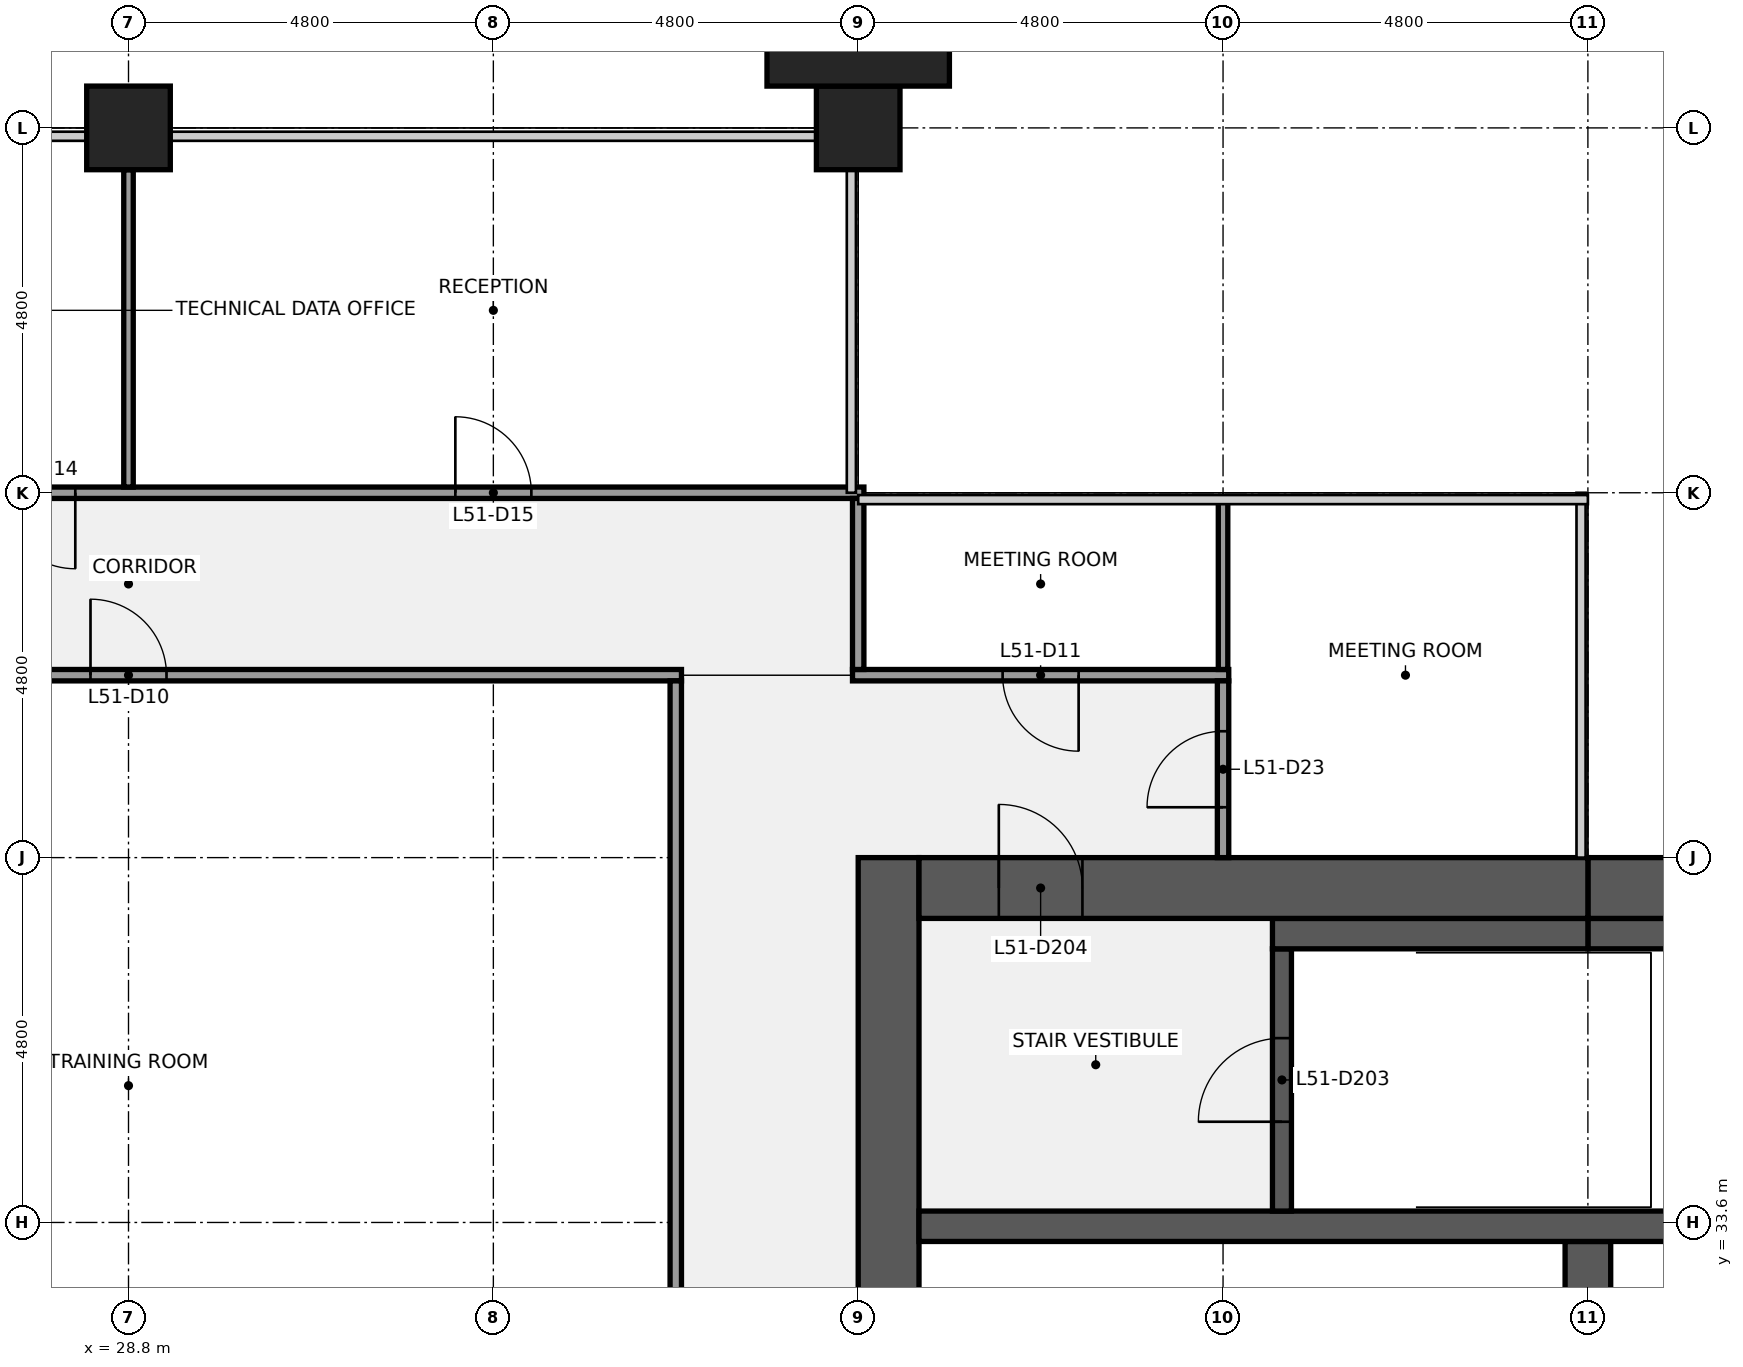
"""IFC4 building model, lengths in metres.
Left out: names, types, materials, properties, quantities, classifications, styles, units other than length and angle.
Written with IfcOpenShell. Run it as: python <this file> out.ifc"""

import sys

from ifc_helpers import new_model, si_unit, direction, frame, frame_2d, origin, origin_2d, place, context, subcontext, project, spatial, rectangle, extrude, element, fill, save


model = new_model("IFC4")
c1 = context("Model", 3, precision=1e-05, world=origin(), true_north=direction((0.0, 1.0)))
c2 = subcontext(c1, "Body", "Model", "MODEL_VIEW")
j1 = project(units=[si_unit("LENGTHUNIT", "METRE"), si_unit("PLANEANGLEUNIT", "RADIAN")], contexts=[c1])
p1 = place(None, origin())
s1 = spatial("IfcSite", under=j1, at=p1, CompositionType="ELEMENT")
p2 = place(p1, origin())
s2 = spatial("IfcBuilding", under=s1, at=p2, CompositionType="ELEMENT")
p3 = place(p2, frame((0.0, 0.0, 233.2)))
s3 = spatial("IfcBuildingStorey", under=s2, at=p3, CompositionType="ELEMENT", Elevation=233.2)
for number, where, z_axis, x_axis in (
    (1, (28.8, 48.0, 0.0), (0.0, 0.0, 1.0), (1.0, 0.0, 0.0)),
    (2, (38.4, 48.0, 0.0), (0.0, 0.0, 1.0), (1.0, 0.0, 0.0)),
):
    element("IfcColumn", number, at=place(p3, frame(where, z_axis=z_axis, x_axis=x_axis)), inside=s3, PredefinedType="COLUMN", context=c2, shape_type="SweptSolid", body=[
        extrude(rectangle(XDim=1.1, YDim=1.1, at=origin_2d()), origin(), (0.0, 0.0, 1.0), 4.0),
    ])
p4 = place(p3, frame((38.8, 9.6, 0.0), z_axis=(0.0, 0.0, 1.0), x_axis=(0.0, 1.0, 0.0)))
e3 = element("IfcWall", 3, at=p4, inside=s3, PredefinedType="SHEAR", context=c2, shape_type="SweptSolid", body=[
    extrude(rectangle(XDim=28.8, YDim=0.8, at=frame_2d((14.4, 0.0))), origin(), (0.0, 0.0, 1.0), 3.84),
])
p5 = place(p4, frame((8.7, 0.0, 0.0)))
e4 = element("IfcOpeningElement", 4, at=p5, cuts=e3, PredefinedType="OPENING", context=c2, shape_type="SweptSolid", body=[
    extrude(rectangle(XDim=1.8, YDim=2.1, at=frame_2d((0.9, 1.05))), frame((0.0, 0.41, 0.0), z_axis=(0.0, -1.0, 0.0), x_axis=(1.0, 0.0, 0.0)), (0.0, 0.0, 1.0), 0.82),
])
p6 = place(p4, frame((18.3, 0.0, 0.0)))
e5 = element("IfcOpeningElement", 5, at=p6, cuts=e3, PredefinedType="OPENING", context=c2, shape_type="SweptSolid", body=[
    extrude(rectangle(XDim=1.8, YDim=2.1, at=frame_2d((0.9, 1.05))), frame((0.0, 0.41, 0.0), z_axis=(0.0, -1.0, 0.0), x_axis=(1.0, 0.0, 0.0)), (0.0, 0.0, 1.0), 0.82),
])
p7 = place(p3, frame((48.0, 30.75, 0.0), z_axis=(0.0, 0.0, 1.0), x_axis=(0.0, 1.0, 0.0)))
e6 = element("IfcWall", 6, at=p7, inside=s3, PredefinedType="SHEAR", context=c2, shape_type="SweptSolid", body=[
    extrude(rectangle(XDim=2.6, YDim=0.6, at=frame_2d((1.3, 0.0))), origin(), (0.0, 0.0, 1.0), 3.84),
])
p8 = place(p3, frame((39.2, 33.55, 0.0), z_axis=(0.0, 0.0, 1.0), x_axis=(1.0, 0.0, 0.0)))
e7 = element("IfcWall", 7, at=p8, inside=s3, PredefinedType="SHEAR", context=c2, shape_type="SweptSolid", body=[
    extrude(rectangle(XDim=17.6, YDim=0.4, at=frame_2d((8.8, 0.0))), origin(), (0.0, 0.0, 1.0), 3.84),
])
p9 = place(p3, frame((43.975, 33.75, 0.0), z_axis=(0.0, 0.0, 1.0), x_axis=(0.0, 1.0, 0.0)))
e8 = element("IfcWall", 8, at=p9, inside=s3, PredefinedType="SHEAR", context=c2, shape_type="SweptSolid", body=[
    extrude(rectangle(XDim=3.45, YDim=0.25, at=frame_2d((1.725, 0.0))), origin(), (0.0, 0.0, 1.0), 3.84),
])
p10 = place(p9, frame((1.175, 0.0, 0.0)))
e9 = element("IfcOpeningElement", 9, at=p10, cuts=e8, PredefinedType="OPENING", context=c2, shape_type="SweptSolid", body=[
    extrude(rectangle(XDim=1.1, YDim=2.1, at=frame_2d((0.55, 1.05))), frame((0.0, 0.135, 0.0), z_axis=(0.0, -1.0, 0.0), x_axis=(1.0, 0.0, 0.0)), (0.0, 0.0, 1.0), 0.27),
])
p11 = place(p3, frame((48.0, 37.4, 0.0), z_axis=(0.0, 0.0, 1.0), x_axis=(1.0, 0.0, 0.0)))
e10 = element("IfcWall", 10, at=p11, inside=s3, PredefinedType="SHEAR", context=c2, shape_type="SweptSolid", body=[
    extrude(rectangle(XDim=3.35, YDim=0.4, at=frame_2d((1.675, 0.0))), origin(), (0.0, 0.0, 1.0), 3.84),
])
p12 = place(p3, frame((43.85, 37.4, 0.0), z_axis=(0.0, 0.0, 1.0), x_axis=(1.0, 0.0, 0.0)))
e11 = element("IfcWall", 11, at=p12, inside=s3, PredefinedType="SHEAR", context=c2, shape_type="SweptSolid", body=[
    extrude(rectangle(XDim=4.15, YDim=0.4, at=frame_2d((2.075, 0.0))), origin(), (0.0, 0.0, 1.0), 3.84),
])
p13 = place(p3, frame((48.0, 38.0, 0.0), z_axis=(0.0, 0.0, 1.0), x_axis=(1.0, 0.0, 0.0)))
e12 = element("IfcWall", 12, at=p13, inside=s3, PredefinedType="SHEAR", context=c2, shape_type="SweptSolid", body=[
    extrude(rectangle(XDim=8.8, YDim=0.8, at=frame_2d((4.4, 0.0))), origin(), (0.0, 0.0, 1.0), 3.84),
])
p14 = place(p13, frame((1.5, 0.0, 0.9)))
e13 = element("IfcOpeningElement", 13, at=p14, cuts=e12, PredefinedType="OPENING", context=c2, shape_type="SweptSolid", body=[
    extrude(rectangle(XDim=1.8, YDim=1.5, at=frame_2d((0.9, 0.75))), frame((0.0, 0.41, 0.0), z_axis=(0.0, -1.0, 0.0), x_axis=(1.0, 0.0, 0.0)), (0.0, 0.0, 1.0), 0.82),
])
p15 = place(p3, frame((39.2, 38.0, 0.0), z_axis=(0.0, 0.0, 1.0), x_axis=(1.0, 0.0, 0.0)))
e14 = element("IfcWall", 14, at=p15, inside=s3, PredefinedType="SHEAR", context=c2, shape_type="SweptSolid", body=[
    extrude(rectangle(XDim=8.8, YDim=0.8, at=frame_2d((4.4, 0.0))), origin(), (0.0, 0.0, 1.0), 3.84),
])
p16 = place(p15, frame((1.05, 0.0, 0.0)))
e15 = element("IfcOpeningElement", 15, at=p16, cuts=e14, PredefinedType="OPENING", context=c2, shape_type="SweptSolid", body=[
    extrude(rectangle(XDim=1.1, YDim=2.1, at=frame_2d((0.55, 1.05))), frame((0.0, 0.41, 0.0), z_axis=(0.0, -1.0, 0.0), x_axis=(1.0, 0.0, 0.0)), (0.0, 0.0, 1.0), 0.82),
])
p17 = place(p3, frame((21.525, 40.8, 0.0), z_axis=(0.0, 0.0, 1.0), x_axis=(1.0, 0.0, 0.0)))
e16 = element("IfcWall", 16, at=p17, inside=s3, PredefinedType="PARTITIONING", context=c2, shape_type="SweptSolid", body=[
    extrude(rectangle(XDim=14.55, YDim=0.15, at=frame_2d((7.275, 0.0))), origin(), (0.0, 0.0, 1.0), 2.87),
])
p18 = place(p17, frame((6.775, 0.0, 0.0)))
e17 = element("IfcOpeningElement", 17, at=p18, cuts=e16, PredefinedType="OPENING", context=c2, shape_type="SweptSolid", body=[
    extrude(rectangle(XDim=1.0, YDim=2.1, at=frame_2d((0.5, 1.05))), frame((0.0, 0.085, 0.0), z_axis=(0.0, -1.0, 0.0), x_axis=(1.0, 0.0, 0.0)), (0.0, 0.0, 1.0), 0.17),
])
p19 = place(p3, frame((38.325, 40.8, 0.0), z_axis=(0.0, 0.0, 1.0), x_axis=(1.0, 0.0, 0.0)))
e18 = element("IfcWall", 18, at=p19, inside=s3, PredefinedType="PARTITIONING", context=c2, shape_type="SweptSolid", body=[
    extrude(rectangle(XDim=4.95, YDim=0.15, at=frame_2d((2.475, 0.0))), origin(), (0.0, 0.0, 1.0), 2.87),
])
p20 = place(p19, frame((1.975, 0.0, 0.0)))
e19 = element("IfcOpeningElement", 19, at=p20, cuts=e18, PredefinedType="OPENING", context=c2, shape_type="SweptSolid", body=[
    extrude(rectangle(XDim=1.0, YDim=2.1, at=frame_2d((0.5, 1.05))), frame((0.0, 0.085, 0.0), z_axis=(0.0, -1.0, 0.0), x_axis=(1.0, 0.0, 0.0)), (0.0, 0.0, 1.0), 0.17),
])
p21 = place(p3, frame((19.125, 43.2, 0.0), z_axis=(0.0, 0.0, 1.0), x_axis=(1.0, 0.0, 0.0)))
e20 = element("IfcWall", 20, at=p21, inside=s3, PredefinedType="PARTITIONING", context=c2, shape_type="SweptSolid", body=[
    extrude(rectangle(XDim=19.35, YDim=0.15, at=frame_2d((9.675, 0.0))), origin(), (0.0, 0.0, 1.0), 2.87),
])
p22 = place(p21, frame((0.775, 0.0, 0.0)))
e21 = element("IfcOpeningElement", 21, at=p22, cuts=e20, PredefinedType="OPENING", context=c2, shape_type="SweptSolid", body=[
    extrude(rectangle(XDim=1.0, YDim=2.1, at=frame_2d((0.5, 1.05))), frame((0.0, 0.085, 0.0), z_axis=(0.0, -1.0, 0.0), x_axis=(1.0, 0.0, 0.0)), (0.0, 0.0, 1.0), 0.17),
])
p23 = place(p21, frame((4.375, 0.0, 0.0)))
e22 = element("IfcOpeningElement", 22, at=p23, cuts=e20, PredefinedType="OPENING", context=c2, shape_type="SweptSolid", body=[
    extrude(rectangle(XDim=1.0, YDim=2.1, at=frame_2d((0.5, 1.05))), frame((0.0, 0.085, 0.0), z_axis=(0.0, -1.0, 0.0), x_axis=(1.0, 0.0, 0.0)), (0.0, 0.0, 1.0), 0.17),
])
p24 = place(p21, frame((7.975, 0.0, 0.0)))
e23 = element("IfcOpeningElement", 23, at=p24, cuts=e20, PredefinedType="OPENING", context=c2, shape_type="SweptSolid", body=[
    extrude(rectangle(XDim=1.0, YDim=2.1, at=frame_2d((0.5, 1.05))), frame((0.0, 0.085, 0.0), z_axis=(0.0, -1.0, 0.0), x_axis=(1.0, 0.0, 0.0)), (0.0, 0.0, 1.0), 0.17),
])
p25 = place(p21, frame((13.975, 0.0, 0.0)))
e24 = element("IfcOpeningElement", 24, at=p25, cuts=e20, PredefinedType="OPENING", context=c2, shape_type="SweptSolid", body=[
    extrude(rectangle(XDim=1.0, YDim=2.1, at=frame_2d((0.5, 1.05))), frame((0.0, 0.085, 0.0), z_axis=(0.0, -1.0, 0.0), x_axis=(1.0, 0.0, 0.0)), (0.0, 0.0, 1.0), 0.17),
])
p26 = place(p3, frame((28.8, 43.275, 0.0), z_axis=(0.0, 0.0, 1.0), x_axis=(0.0, 1.0, 0.0)))
e25 = element("IfcWall", 25, at=p26, inside=s3, PredefinedType="PARTITIONING", context=c2, shape_type="SweptSolid", body=[
    extrude(rectangle(XDim=4.175, YDim=0.125, at=frame_2d((2.087, 0.0))), origin(), (0.0, 0.0, 1.0), 2.87),
])
p27 = place(p3, frame((36.0, 30.062, 0.0), z_axis=(0.0, 0.0, 1.0), x_axis=(0.0, 1.0, 0.0)))
e26 = element("IfcWall", 26, at=p27, inside=s3, PredefinedType="PARTITIONING", context=c2, shape_type="SweptSolid", body=[
    extrude(rectangle(XDim=10.663, YDim=0.15, at=frame_2d((5.331, 0.0))), origin(), (0.0, 0.0, 1.0), 2.87),
])
p28 = place(p3, frame((38.4, 40.875, 0.0), z_axis=(0.0, 0.0, 1.0), x_axis=(0.0, 1.0, 0.0)))
e27 = element("IfcWall", 27, at=p28, inside=s3, PredefinedType="PARTITIONING", context=c2, shape_type="SweptSolid", body=[
    extrude(rectangle(XDim=2.25, YDim=0.15, at=frame_2d((1.125, 0.0))), origin(), (0.0, 0.0, 1.0), 2.87),
])
p29 = place(p3, frame((43.2, 40.875, 0.0), z_axis=(0.0, 0.0, 1.0), x_axis=(0.0, 1.0, 0.0)))
e28 = element("IfcWall", 28, at=p29, inside=s3, PredefinedType="PARTITIONING", context=c2, shape_type="SweptSolid", body=[
    extrude(rectangle(XDim=2.225, YDim=0.125, at=frame_2d((1.113, 0.0))), origin(), (0.0, 0.0, 1.0), 2.87),
])
p30 = place(p3, frame((43.2, 38.4, 0.0), z_axis=(0.0, 0.0, 1.0), x_axis=(0.0, 1.0, 0.0)))
e29 = element("IfcWall", 29, at=p30, inside=s3, PredefinedType="PARTITIONING", context=c2, shape_type="SweptSolid", body=[
    extrude(rectangle(XDim=2.325, YDim=0.15, at=frame_2d((1.163, 0.0))), origin(), (0.0, 0.0, 1.0), 2.87),
])
p31 = place(p30, frame((0.663, 0.0, 0.0)))
e30 = element("IfcOpeningElement", 30, at=p31, cuts=e29, PredefinedType="OPENING", context=c2, shape_type="SweptSolid", body=[
    extrude(rectangle(XDim=1.0, YDim=2.1, at=frame_2d((0.5, 1.05))), frame((0.0, 0.085, 0.0), z_axis=(0.0, -1.0, 0.0), x_axis=(1.0, 0.0, 0.0)), (0.0, 0.0, 1.0), 0.17),
])
p32 = place(p3, frame((38.4, 49.025, 0.0), z_axis=(0.0, 0.0, 1.0), x_axis=(1.0, 0.0, 0.0)))
e31 = element("IfcColumn", 31, at=p32, inside=s3, PredefinedType="PILASTER", context=c2, shape_type="SweptSolid", body=[
    extrude(rectangle(XDim=2.4, YDim=0.95, at=origin_2d()), origin(), (0.0, 0.0, 1.0), 4.0),
])
p33 = place(p10, origin())
e32 = element("IfcDoor", 32, at=p33, inside=s3, OperationType="SINGLE_SWING_LEFT", PredefinedType="DOOR", context=c2, shape_type="SweptSolid", body=[
    extrude(rectangle(XDim=1.1, YDim=2.1, at=frame_2d((0.55, 1.05))), frame((0.0, 0.025, 0.0), z_axis=(0.0, -1.0, 0.0), x_axis=(1.0, 0.0, 0.0)), (0.0, 0.0, 1.0), 0.05),
])
fill(e9, e32)
p34 = place(p16, origin())
e33 = element("IfcDoor", 33, at=p34, inside=s3, OperationType="SINGLE_SWING_LEFT", PredefinedType="DOOR", context=c2, shape_type="SweptSolid", body=[
    extrude(rectangle(XDim=1.1, YDim=2.1, at=frame_2d((0.55, 1.05))), frame((0.0, 0.025, 0.0), z_axis=(0.0, -1.0, 0.0), x_axis=(1.0, 0.0, 0.0)), (0.0, 0.0, 1.0), 0.05),
])
fill(e15, e33)
p35 = place(p18, origin())
e34 = element("IfcDoor", 34, at=p35, inside=s3, OperationType="SINGLE_SWING_LEFT", PredefinedType="DOOR", context=c2, shape_type="SweptSolid", body=[
    extrude(rectangle(XDim=1.0, YDim=2.1, at=frame_2d((0.5, 1.05))), frame((0.0, 0.025, 0.0), z_axis=(0.0, -1.0, 0.0), x_axis=(1.0, 0.0, 0.0)), (0.0, 0.0, 1.0), 0.05),
])
fill(e17, e34)
p36 = place(p20, origin())
e35 = element("IfcDoor", 35, at=p36, inside=s3, OperationType="SINGLE_SWING_RIGHT", PredefinedType="DOOR", context=c2, shape_type="SweptSolid", body=[
    extrude(rectangle(XDim=1.0, YDim=2.1, at=frame_2d((0.5, 1.05))), frame((0.0, 0.025, 0.0), z_axis=(0.0, -1.0, 0.0), x_axis=(1.0, 0.0, 0.0)), (0.0, 0.0, 1.0), 0.05),
])
fill(e19, e35)
p37 = place(p24, origin())
e36 = element("IfcDoor", 36, at=p37, inside=s3, OperationType="SINGLE_SWING_RIGHT", PredefinedType="DOOR", context=c2, shape_type="SweptSolid", body=[
    extrude(rectangle(XDim=1.0, YDim=2.1, at=frame_2d((0.5, 1.05))), frame((0.0, 0.025, 0.0), z_axis=(0.0, -1.0, 0.0), x_axis=(1.0, 0.0, 0.0)), (0.0, 0.0, 1.0), 0.05),
])
fill(e23, e36)
p38 = place(p25, origin())
e37 = element("IfcDoor", 37, at=p38, inside=s3, OperationType="SINGLE_SWING_LEFT", PredefinedType="DOOR", context=c2, shape_type="SweptSolid", body=[
    extrude(rectangle(XDim=1.0, YDim=2.1, at=frame_2d((0.5, 1.05))), frame((0.0, 0.025, 0.0), z_axis=(0.0, -1.0, 0.0), x_axis=(1.0, 0.0, 0.0)), (0.0, 0.0, 1.0), 0.05),
])
fill(e24, e37)
p39 = place(p31, origin())
e38 = element("IfcDoor", 38, at=p39, inside=s3, OperationType="SINGLE_SWING_LEFT", PredefinedType="DOOR", context=c2, shape_type="SweptSolid", body=[
    extrude(rectangle(XDim=1.0, YDim=2.1, at=frame_2d((0.5, 1.05))), frame((0.0, 0.025, 0.0), z_axis=(0.0, -1.0, 0.0), x_axis=(1.0, 0.0, 0.0)), (0.0, 0.0, 1.0), 0.05),
])
fill(e30, e38)
save(model, sys.argv[1])
